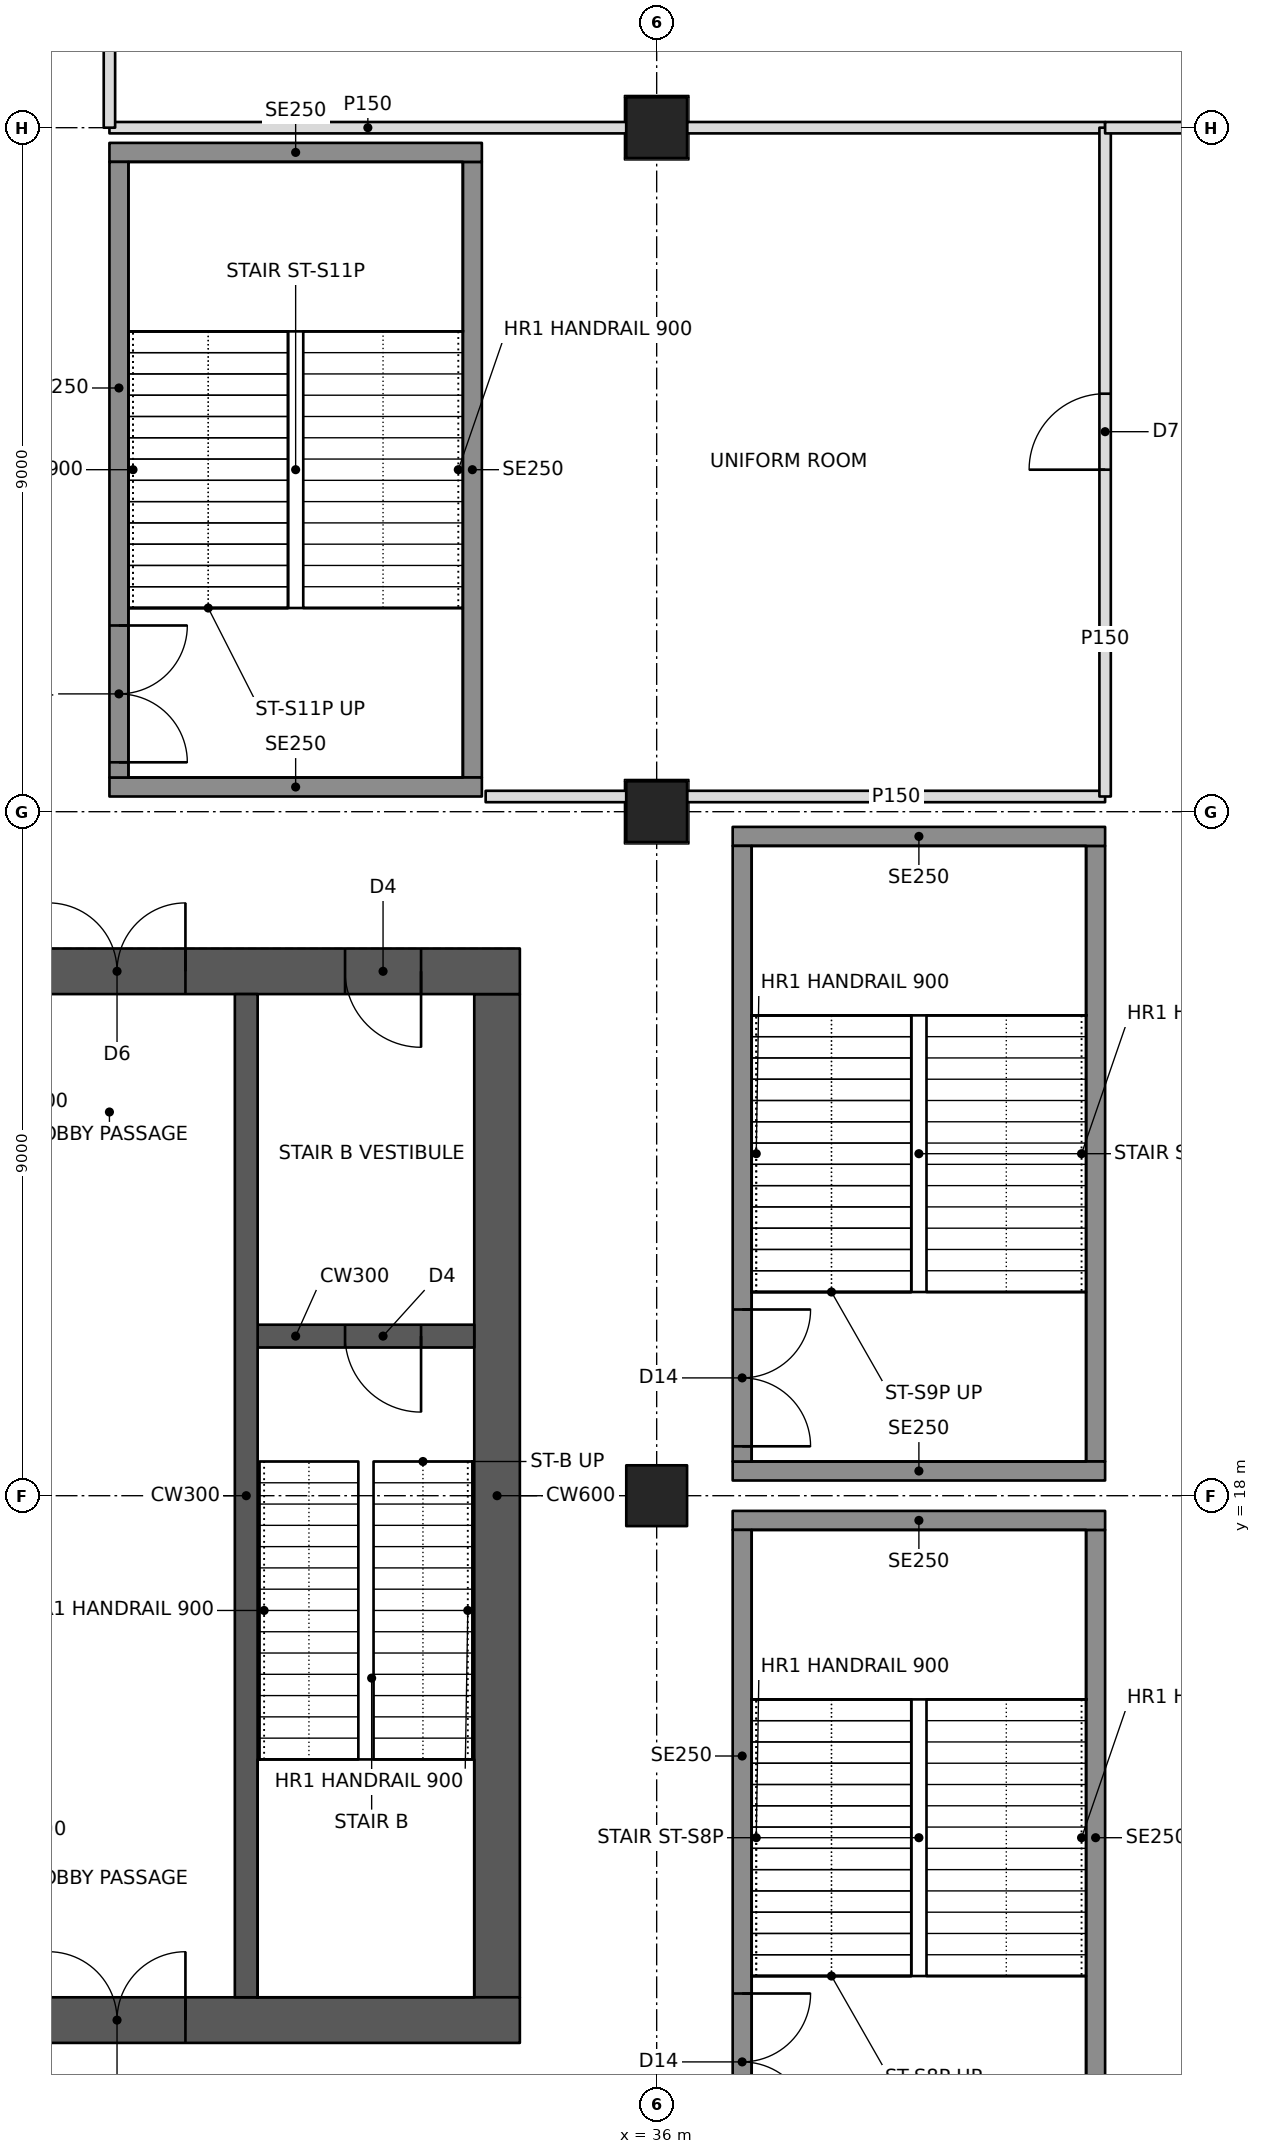
"""IFC4 building model, lengths in metres.
Left out: names, types, materials, properties, quantities, classifications, styles, units other than length and angle.
Written with IfcOpenShell. Run it as: python <this file> out.ifc"""

import sys

from ifc_helpers import new_model, si_unit, direction, frame, frame_2d, origin, origin_2d, place, context, subcontext, project, spatial, rectangle, hollow_rectangle, extrude, element, fill, save


model = new_model("IFC4")
c1 = context("Model", 3, precision=1e-05, world=origin(), true_north=direction((0.0, 1.0)))
c2 = subcontext(c1, "Body", "Model", "MODEL_VIEW")
j1 = project(units=[si_unit("LENGTHUNIT", "METRE"), si_unit("PLANEANGLEUNIT", "RADIAN")], contexts=[c1])
p1 = place(None, origin())
s1 = spatial("IfcSite", under=j1, at=p1, CompositionType="ELEMENT")
p2 = place(p1, origin())
s2 = spatial("IfcBuilding", under=s1, at=p2, CompositionType="ELEMENT")
p3 = place(p2, frame((0.0, 0.0, -10.5)))
s3 = spatial("IfcBuildingStorey", under=s2, at=p3, CompositionType="ELEMENT", Elevation=-10.5)
for number, where, z_axis, x_axis in (
    (1, (36.0, 18.0, -0.5), (0.0, 0.0, 1.0), (0.0, 1.0, 0.0)),
    (2, (36.0, 27.0, -0.5), (0.0, 0.0, 1.0), (1.0, 0.0, 0.0)),
    (3, (36.0, 36.0, -0.5), (0.0, 0.0, 1.0), (1.0, 0.0, 0.0)),
):
    element("IfcColumn", number, at=place(p3, frame(where, z_axis=z_axis, x_axis=x_axis)), inside=s3, PredefinedType="COLUMN", context=c2, shape_type="SweptSolid", body=[
        extrude(hollow_rectangle(XDim=0.8, YDim=0.8, WallThickness=0.1, at=origin_2d()), origin(), (0.0, 0.0, 1.0), 5.5),
    ])
p4 = place(p3, frame((10.8, 11.1, -0.5), z_axis=(0.0, 0.0, 1.0), x_axis=(1.0, 0.0, 0.0)))
e4 = element("IfcWall", 4, at=p4, inside=s3, PredefinedType="SHEAR", context=c2, shape_type="SweptSolid", body=[
    extrude(rectangle(XDim=23.4, YDim=0.6, at=frame_2d((11.7, 0.0))), origin(), (0.0, 0.0, 1.0), 5.5),
])
p5 = place(p4, frame((1.0, 0.0, 0.5)))
e5 = element("IfcOpeningElement", 5, at=p5, cuts=e4, PredefinedType="OPENING", context=c2, shape_type="SweptSolid", body=[
    extrude(rectangle(XDim=1.0, YDim=2.1, at=frame_2d((0.5, 1.05))), frame((0.0, 0.31, 0.0), z_axis=(0.0, -1.0, 0.0), x_axis=(1.0, 0.0, 0.0)), (0.0, 0.0, 1.0), 0.62),
])
p6 = place(p4, frame((17.2, 0.0, 0.5)))
e6 = element("IfcOpeningElement", 6, at=p6, cuts=e4, PredefinedType="OPENING", context=c2, shape_type="SweptSolid", body=[
    extrude(rectangle(XDim=1.8, YDim=2.1, at=frame_2d((0.9, 1.05))), frame((0.0, 0.31, 0.0), z_axis=(0.0, -1.0, 0.0), x_axis=(1.0, 0.0, 0.0)), (0.0, 0.0, 1.0), 0.62),
])
p7 = place(p3, frame((10.8, 24.9, -0.5), z_axis=(0.0, 0.0, 1.0), x_axis=(1.0, 0.0, 0.0)))
e7 = element("IfcWall", 7, at=p7, inside=s3, PredefinedType="SHEAR", context=c2, shape_type="SweptSolid", body=[
    extrude(rectangle(XDim=23.4, YDim=0.6, at=frame_2d((11.7, 0.0))), origin(), (0.0, 0.0, 1.0), 5.5),
])
p8 = place(p7, frame((17.2, 0.0, 0.5)))
e8 = element("IfcOpeningElement", 8, at=p8, cuts=e7, PredefinedType="OPENING", context=c2, shape_type="SweptSolid", body=[
    extrude(rectangle(XDim=1.8, YDim=2.1, at=frame_2d((0.9, 1.05))), frame((0.0, 0.31, 0.0), z_axis=(0.0, -1.0, 0.0), x_axis=(1.0, 0.0, 0.0)), (0.0, 0.0, 1.0), 0.62),
])
p9 = place(p7, frame((21.1, 0.0, 0.5)))
e9 = element("IfcOpeningElement", 9, at=p9, cuts=e7, PredefinedType="OPENING", context=c2, shape_type="SweptSolid", body=[
    extrude(rectangle(XDim=1.0, YDim=2.1, at=frame_2d((0.5, 1.05))), frame((0.0, 0.31, 0.0), z_axis=(0.0, -1.0, 0.0), x_axis=(1.0, 0.0, 0.0)), (0.0, 0.0, 1.0), 0.62),
])
p10 = place(p3, frame((33.9, 11.4, -0.5), z_axis=(0.0, 0.0, 1.0), x_axis=(0.0, 1.0, 0.0)))
e10 = element("IfcWall", 10, at=p10, inside=s3, PredefinedType="SHEAR", context=c2, shape_type="SweptSolid", body=[
    extrude(rectangle(XDim=13.2, YDim=0.6, at=frame_2d((6.6, 0.0))), origin(), (0.0, 0.0, 1.0), 5.5),
])
p11 = place(p3, frame((30.6, 11.4, -0.5), z_axis=(0.0, 0.0, 1.0), x_axis=(0.0, 1.0, 0.0)))
e11 = element("IfcWall", 11, at=p11, inside=s3, PredefinedType="SHEAR", context=c2, shape_type="SweptSolid", body=[
    extrude(rectangle(XDim=13.2, YDim=0.3, at=frame_2d((6.6, 0.0))), origin(), (0.0, 0.0, 1.0), 5.5),
])
p12 = place(p3, frame((30.75, 20.1, -0.5), z_axis=(0.0, 0.0, 1.0), x_axis=(1.0, 0.0, 0.0)))
e12 = element("IfcWall", 12, at=p12, inside=s3, PredefinedType="SHEAR", context=c2, shape_type="SweptSolid", body=[
    extrude(rectangle(XDim=2.85, YDim=0.3, at=frame_2d((1.425, 0.0))), origin(), (0.0, 0.0, 1.0), 5.5),
])
p13 = place(p12, frame((1.15, 0.0, 0.5)))
e13 = element("IfcOpeningElement", 13, at=p13, cuts=e12, PredefinedType="OPENING", context=c2, shape_type="SweptSolid", body=[
    extrude(rectangle(XDim=1.0, YDim=2.1, at=frame_2d((0.5, 1.05))), frame((0.0, 0.16, 0.0), z_axis=(0.0, -1.0, 0.0), x_axis=(1.0, 0.0, 0.0)), (0.0, 0.0, 1.0), 0.32),
])
p14 = place(p3, frame((41.9, 36.0, 0.0), z_axis=(0.0, 0.0, 1.0), x_axis=(-1.0, 0.0, 0.0)))
e14 = element("IfcWall", 14, at=p14, inside=s3, PredefinedType="PARTITIONING", context=c2, shape_type="SweptSolid", body=[
    extrude(rectangle(XDim=5.5, YDim=0.15, at=frame_2d((2.75, 0.0))), origin(), (0.0, 0.0, 1.0), 3.842),
])
p15 = place(p3, frame((35.6, 36.0, 0.0), z_axis=(0.0, 0.0, 1.0), x_axis=(-1.0, 0.0, 0.0)))
e15 = element("IfcWall", 15, at=p15, inside=s3, PredefinedType="PARTITIONING", context=c2, shape_type="SweptSolid", body=[
    extrude(rectangle(XDim=6.8, YDim=0.15, at=frame_2d((3.4, 0.0))), origin(), (0.0, 0.0, 1.0), 3.842),
])
p16 = place(p3, frame((28.8, 36.0, 0.0), z_axis=(0.0, 0.0, 1.0), x_axis=(0.0, 1.0, 0.0)))
e16 = element("IfcWall", 16, at=p16, inside=s3, PredefinedType="PARTITIONING", context=c2, shape_type="SweptSolid", body=[
    extrude(rectangle(XDim=9.3, YDim=0.15, at=frame_2d((4.65, 0.0))), origin(), (0.0, 0.0, 1.0), 3.841),
])
p17 = place(p16, frame((4.0, 0.0, 0.0)))
e17 = element("IfcOpeningElement", 17, at=p17, cuts=e16, PredefinedType="OPENING", context=c2, shape_type="SweptSolid", body=[
    extrude(rectangle(XDim=1.0, YDim=2.1, at=frame_2d((0.5, 1.05))), frame((0.0, 0.085, 0.0), z_axis=(0.0, -1.0, 0.0), x_axis=(1.0, 0.0, 0.0)), (0.0, 0.0, 1.0), 0.17),
])
p18 = place(p3, frame((41.9, 27.2, 0.0), z_axis=(0.0, 0.0, 1.0), x_axis=(-1.0, 0.0, 0.0)))
e18 = element("IfcWall", 18, at=p18, inside=s3, PredefinedType="PARTITIONING", context=c2, shape_type="SweptSolid", body=[
    extrude(rectangle(XDim=5.5, YDim=0.15, at=frame_2d((2.75, 0.0))), origin(), (0.0, 0.0, 1.0), 3.842),
])
p19 = place(p3, frame((35.6, 27.2, 0.0), z_axis=(0.0, 0.0, 1.0), x_axis=(-1.0, 0.0, 0.0)))
e19 = element("IfcWall", 19, at=p19, inside=s3, PredefinedType="PARTITIONING", context=c2, shape_type="SweptSolid", body=[
    extrude(rectangle(XDim=1.85, YDim=0.15, at=frame_2d((0.925, 0.0))), origin(), (0.0, 0.0, 1.0), 3.842),
])
p20 = place(p3, frame((41.9, 36.0, 0.0), z_axis=(0.0, 0.0, 1.0), x_axis=(0.0, -1.0, 0.0)))
e20 = element("IfcWall", 20, at=p20, inside=s3, PredefinedType="PARTITIONING", context=c2, shape_type="SweptSolid", body=[
    extrude(rectangle(XDim=8.8, YDim=0.15, at=frame_2d((4.4, 0.0))), origin(), (0.0, 0.0, 1.0), 3.841),
])
p21 = place(p20, frame((3.5, 0.0, 0.0)))
e21 = element("IfcOpeningElement", 21, at=p21, cuts=e20, PredefinedType="OPENING", context=c2, shape_type="SweptSolid", body=[
    extrude(rectangle(XDim=1.0, YDim=2.1, at=frame_2d((0.5, 1.05))), frame((0.0, 0.085, 0.0), z_axis=(0.0, -1.0, 0.0), x_axis=(1.0, 0.0, 0.0)), (0.0, 0.0, 1.0), 0.17),
])
p22 = place(p3, frame((44.6, 36.0, 0.0), z_axis=(0.0, 0.0, 1.0), x_axis=(-1.0, 0.0, 0.0)))
e22 = element("IfcWall", 22, at=p22, inside=s3, PredefinedType="PARTITIONING", context=c2, shape_type="SweptSolid", body=[
    extrude(rectangle(XDim=2.7, YDim=0.15, at=frame_2d((1.35, 0.0))), origin(), (0.0, 0.0, 1.0), 3.842),
])
p23 = place(p3, frame((37.0, 17.675, 0.0), z_axis=(0.0, 0.0, 1.0), x_axis=(1.0, 0.0, 0.0)))
e23 = element("IfcWall", 23, at=p23, inside=s3, PredefinedType="SOLIDWALL", context=c2, shape_type="SweptSolid", body=[
    extrude(rectangle(XDim=4.9, YDim=0.25, at=frame_2d((2.45, 0.0))), origin(), (0.0, 0.0, 1.0), 4.7),
])
p24 = place(p3, frame((37.125, 9.45, 0.0), z_axis=(0.0, 0.0, 1.0), x_axis=(0.0, 1.0, 0.0)))
e24 = element("IfcWall", 24, at=p24, inside=s3, PredefinedType="SOLIDWALL", context=c2, shape_type="SweptSolid", body=[
    extrude(rectangle(XDim=8.1, YDim=0.25, at=frame_2d((4.05, 0.0))), origin(), (0.0, 0.0, 1.0), 4.7),
])
p25 = place(p24, frame((0.2, 0.0, 0.0)))
e25 = element("IfcOpeningElement", 25, at=p25, cuts=e24, PredefinedType="OPENING", context=c2, shape_type="SweptSolid", body=[
    extrude(rectangle(XDim=1.8, YDim=2.1, at=frame_2d((0.9, 1.05))), frame((0.0, 0.135, 0.0), z_axis=(0.0, -1.0, 0.0), x_axis=(1.0, 0.0, 0.0)), (0.0, 0.0, 1.0), 0.27),
])
p26 = place(p3, frame((41.775, 9.45, 0.0), z_axis=(0.0, 0.0, 1.0), x_axis=(0.0, 1.0, 0.0)))
e26 = element("IfcWall", 26, at=p26, inside=s3, PredefinedType="SOLIDWALL", context=c2, shape_type="SweptSolid", body=[
    extrude(rectangle(XDim=8.1, YDim=0.25, at=frame_2d((4.05, 0.0))), origin(), (0.0, 0.0, 1.0), 4.7),
])
for number, where, z_axis, x_axis in (
    (27, (37.0, 18.325, 0.0), (0.0, 0.0, 1.0), (1.0, 0.0, 0.0)),
    (28, (37.0, 26.675, 0.0), (0.0, 0.0, 1.0), (1.0, 0.0, 0.0)),
):
    element("IfcWall", number, at=place(p3, frame(where, z_axis=z_axis, x_axis=x_axis)), inside=s3, PredefinedType="SOLIDWALL", context=c2, shape_type="SweptSolid", body=[
        extrude(rectangle(XDim=4.9, YDim=0.25, at=frame_2d((2.45, 0.0))), origin(), (0.0, 0.0, 1.0), 4.7),
    ])
p27 = place(p3, frame((37.125, 18.45, 0.0), z_axis=(0.0, 0.0, 1.0), x_axis=(0.0, 1.0, 0.0)))
e29 = element("IfcWall", 29, at=p27, inside=s3, PredefinedType="SOLIDWALL", context=c2, shape_type="SweptSolid", body=[
    extrude(rectangle(XDim=8.1, YDim=0.25, at=frame_2d((4.05, 0.0))), origin(), (0.0, 0.0, 1.0), 4.7),
])
p28 = place(p27, frame((0.2, 0.0, 0.0)))
e30 = element("IfcOpeningElement", 30, at=p28, cuts=e29, PredefinedType="OPENING", context=c2, shape_type="SweptSolid", body=[
    extrude(rectangle(XDim=1.8, YDim=2.1, at=frame_2d((0.9, 1.05))), frame((0.0, 0.135, 0.0), z_axis=(0.0, -1.0, 0.0), x_axis=(1.0, 0.0, 0.0)), (0.0, 0.0, 1.0), 0.27),
])
p29 = place(p3, frame((41.775, 18.45, 0.0), z_axis=(0.0, 0.0, 1.0), x_axis=(0.0, 1.0, 0.0)))
e31 = element("IfcWall", 31, at=p29, inside=s3, PredefinedType="SOLIDWALL", context=c2, shape_type="SweptSolid", body=[
    extrude(rectangle(XDim=8.1, YDim=0.25, at=frame_2d((4.05, 0.0))), origin(), (0.0, 0.0, 1.0), 4.7),
])
for number, where, z_axis, x_axis in (
    (32, (28.8, 27.325, 0.0), (0.0, 0.0, 1.0), (1.0, 0.0, 0.0)),
    (33, (28.8, 35.675, 0.0), (0.0, 0.0, 1.0), (1.0, 0.0, 0.0)),
):
    element("IfcWall", number, at=place(p3, frame(where, z_axis=z_axis, x_axis=x_axis)), inside=s3, PredefinedType="SOLIDWALL", context=c2, shape_type="SweptSolid", body=[
        extrude(rectangle(XDim=4.9, YDim=0.25, at=frame_2d((2.45, 0.0))), origin(), (0.0, 0.0, 1.0), 4.7),
    ])
p30 = place(p3, frame((28.925, 27.45, 0.0), z_axis=(0.0, 0.0, 1.0), x_axis=(0.0, 1.0, 0.0)))
e34 = element("IfcWall", 34, at=p30, inside=s3, PredefinedType="SOLIDWALL", context=c2, shape_type="SweptSolid", body=[
    extrude(rectangle(XDim=8.1, YDim=0.25, at=frame_2d((4.05, 0.0))), origin(), (0.0, 0.0, 1.0), 4.7),
])
p31 = place(p30, frame((0.2, 0.0, 0.0)))
e35 = element("IfcOpeningElement", 35, at=p31, cuts=e34, PredefinedType="OPENING", context=c2, shape_type="SweptSolid", body=[
    extrude(rectangle(XDim=1.8, YDim=2.1, at=frame_2d((0.9, 1.05))), frame((0.0, 0.135, 0.0), z_axis=(0.0, -1.0, 0.0), x_axis=(1.0, 0.0, 0.0)), (0.0, 0.0, 1.0), 0.27),
])
p32 = place(p3, frame((33.575, 27.45, 0.0), z_axis=(0.0, 0.0, 1.0), x_axis=(0.0, 1.0, 0.0)))
e36 = element("IfcWall", 36, at=p32, inside=s3, PredefinedType="SOLIDWALL", context=c2, shape_type="SweptSolid", body=[
    extrude(rectangle(XDim=8.1, YDim=0.25, at=frame_2d((4.05, 0.0))), origin(), (0.0, 0.0, 1.0), 4.7),
])
p33 = place(p21, frame((1.0, 0.0, 0.0), z_axis=(0.0, 0.0, 1.0), x_axis=(-1.0, 0.0, 0.0)))
e37 = element("IfcDoor", 37, at=p33, inside=s3, OperationType="SINGLE_SWING_LEFT", PredefinedType="DOOR", context=c2, shape_type="SweptSolid", body=[
    extrude(rectangle(XDim=1.0, YDim=2.1, at=frame_2d((0.5, 1.05))), frame((0.0, 0.025, 0.0), z_axis=(0.0, -1.0, 0.0), x_axis=(1.0, 0.0, 0.0)), (0.0, 0.0, 1.0), 0.05),
])
fill(e21, e37)
p34 = place(p6, origin())
e38 = element("IfcDoor", 38, at=p34, inside=s3, OperationType="DOUBLE_DOOR_SINGLE_SWING", PredefinedType="DOOR", context=c2, shape_type="SweptSolid", body=[
    extrude(rectangle(XDim=1.8, YDim=2.1, at=frame_2d((0.9, 1.05))), frame((0.0, 0.025, 0.0), z_axis=(0.0, -1.0, 0.0), x_axis=(1.0, 0.0, 0.0)), (0.0, 0.0, 1.0), 0.05),
])
fill(e6, e38)
p35 = place(p8, origin())
e39 = element("IfcDoor", 39, at=p35, inside=s3, OperationType="DOUBLE_DOOR_SINGLE_SWING", PredefinedType="DOOR", context=c2, shape_type="SweptSolid", body=[
    extrude(rectangle(XDim=1.8, YDim=2.1, at=frame_2d((0.9, 1.05))), frame((0.0, 0.025, 0.0), z_axis=(0.0, -1.0, 0.0), x_axis=(1.0, 0.0, 0.0)), (0.0, 0.0, 1.0), 0.05),
])
fill(e8, e39)
p36 = place(p9, frame((1.0, 0.0, 0.0), z_axis=(0.0, 0.0, 1.0), x_axis=(-1.0, 0.0, 0.0)))
e40 = element("IfcDoor", 40, at=p36, inside=s3, OperationType="SINGLE_SWING_LEFT", PredefinedType="DOOR", context=c2, shape_type="SweptSolid", body=[
    extrude(rectangle(XDim=1.0, YDim=2.1, at=frame_2d((0.5, 1.05))), frame((0.0, 0.025, 0.0), z_axis=(0.0, -1.0, 0.0), x_axis=(1.0, 0.0, 0.0)), (0.0, 0.0, 1.0), 0.05),
])
fill(e9, e40)
p37 = place(p13, frame((1.0, 0.0, 0.0), z_axis=(0.0, 0.0, 1.0), x_axis=(-1.0, 0.0, 0.0)))
e41 = element("IfcDoor", 41, at=p37, inside=s3, OperationType="SINGLE_SWING_LEFT", PredefinedType="DOOR", context=c2, shape_type="SweptSolid", body=[
    extrude(rectangle(XDim=1.0, YDim=2.1, at=frame_2d((0.5, 1.05))), frame((0.0, 0.025, 0.0), z_axis=(0.0, -1.0, 0.0), x_axis=(1.0, 0.0, 0.0)), (0.0, 0.0, 1.0), 0.05),
])
fill(e13, e41)
p38 = place(p25, frame((1.8, 0.0, 0.0), z_axis=(0.0, 0.0, 1.0), x_axis=(-1.0, 0.0, 0.0)))
e42 = element("IfcDoor", 42, at=p38, inside=s3, OperationType="DOUBLE_DOOR_SINGLE_SWING", PredefinedType="DOOR", context=c2, shape_type="SweptSolid", body=[
    extrude(rectangle(XDim=1.8, YDim=2.1, at=frame_2d((0.9, 1.05))), frame((0.0, 0.025, 0.0), z_axis=(0.0, -1.0, 0.0), x_axis=(1.0, 0.0, 0.0)), (0.0, 0.0, 1.0), 0.05),
])
fill(e25, e42)
p39 = place(p28, frame((1.8, 0.0, 0.0), z_axis=(0.0, 0.0, 1.0), x_axis=(-1.0, 0.0, 0.0)))
e43 = element("IfcDoor", 43, at=p39, inside=s3, OperationType="DOUBLE_DOOR_SINGLE_SWING", PredefinedType="DOOR", context=c2, shape_type="SweptSolid", body=[
    extrude(rectangle(XDim=1.8, YDim=2.1, at=frame_2d((0.9, 1.05))), frame((0.0, 0.025, 0.0), z_axis=(0.0, -1.0, 0.0), x_axis=(1.0, 0.0, 0.0)), (0.0, 0.0, 1.0), 0.05),
])
fill(e30, e43)
p40 = place(p31, frame((1.8, 0.0, 0.0), z_axis=(0.0, 0.0, 1.0), x_axis=(-1.0, 0.0, 0.0)))
e44 = element("IfcDoor", 44, at=p40, inside=s3, OperationType="DOUBLE_DOOR_SINGLE_SWING", PredefinedType="DOOR", context=c2, shape_type="SweptSolid", body=[
    extrude(rectangle(XDim=1.8, YDim=2.1, at=frame_2d((0.9, 1.05))), frame((0.0, 0.025, 0.0), z_axis=(0.0, -1.0, 0.0), x_axis=(1.0, 0.0, 0.0)), (0.0, 0.0, 1.0), 0.05),
])
fill(e35, e44)
save(model, sys.argv[1])
